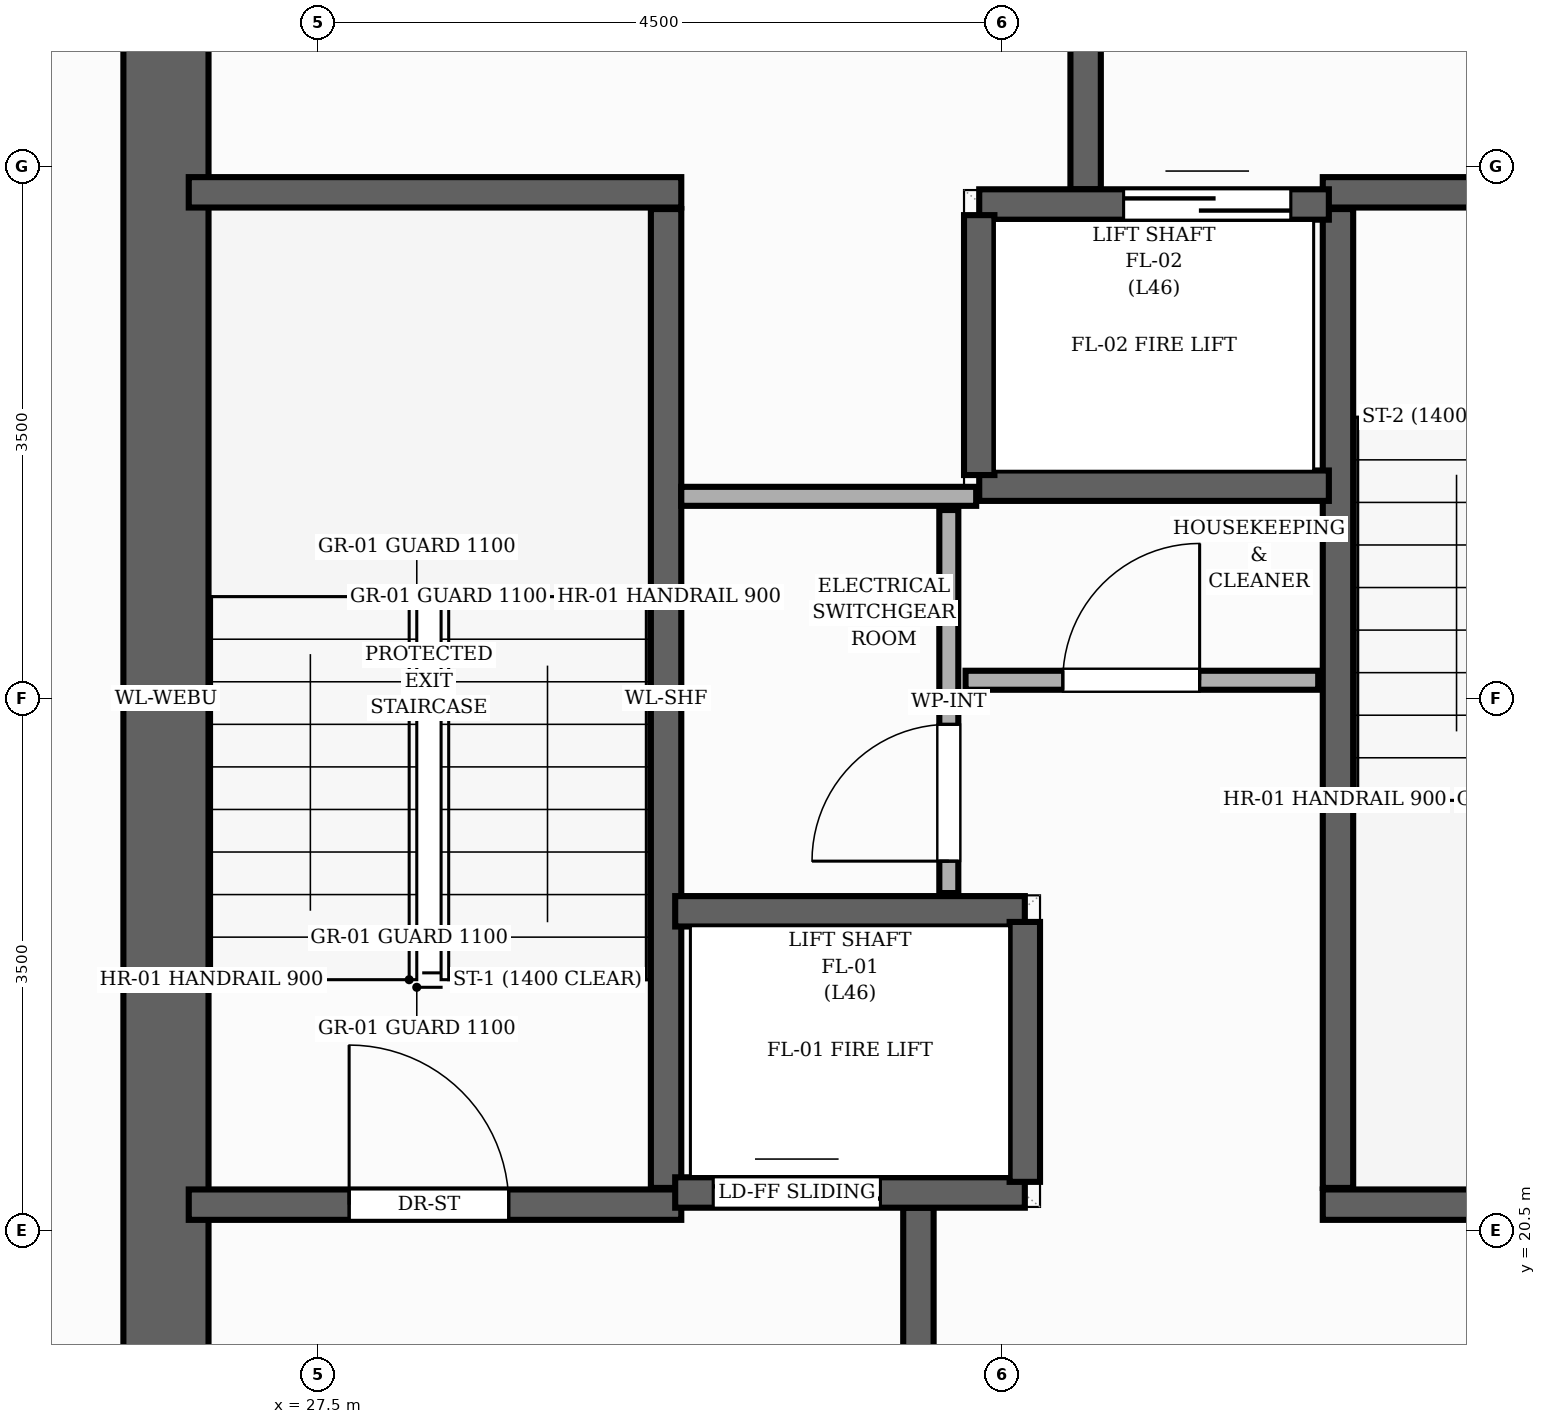
"""IFC4 building model, lengths in metres.
Left out: names, types, materials, properties, quantities, classifications, styles, units other than length and angle.
Written with IfcOpenShell. Run it as: python <this file> out.ifc"""

import sys

from ifc_helpers import new_model, si_unit, direction, frame, frame_2d, origin, place, context, subcontext, project, spatial, rectangle, extrude, element, fill, save


model = new_model("IFC4")
c1 = context("Model", 3, precision=1e-05, world=origin(), true_north=direction((0.0, 1.0)))
c2 = subcontext(c1, "Body", "Model", "MODEL_VIEW")
j1 = project(units=[si_unit("LENGTHUNIT", "METRE"), si_unit("PLANEANGLEUNIT", "RADIAN")], contexts=[c1])
p1 = place(None, origin())
s1 = spatial("IfcSite", under=j1, at=p1, CompositionType="ELEMENT")
p2 = place(p1, origin())
s2 = spatial("IfcBuilding", under=s1, at=p2, CompositionType="ELEMENT")
p3 = place(p2, frame((0.0, 0.0, 155.36)))
s3 = spatial("IfcBuildingStorey", under=s2, at=p3, CompositionType="ELEMENT", Elevation=155.36)
p4 = place(p3, frame((26.5, 17.3, 0.0), z_axis=(0.0, 0.0, 1.0), x_axis=(0.0, 1.0, 0.0)))
e1 = element("IfcWall", 1, at=p4, inside=s3, PredefinedType="SHEAR", context=c2, shape_type="SweptSolid", body=[
    extrude(rectangle(XDim=13.4, YDim=0.56, at=frame_2d((6.7, 0.0))), origin(), (0.0, 0.0, 1.0), 3.2),
])
p5 = place(p3, frame((29.79, 20.78, 0.0), z_axis=(0.0, 0.0, 1.0), x_axis=(0.0, 1.0, 0.0)))
e2 = element("IfcWall", 2, at=p5, inside=s3, PredefinedType="SHEAR", context=c2, shape_type="SweptSolid", body=[
    extrude(rectangle(XDim=6.44, YDim=0.2, at=frame_2d((3.22, 0.0))), origin(), (0.0, 0.0, 1.0), 3.2),
])
p6 = place(p3, frame((26.65, 27.33, 0.0), z_axis=(0.0, 0.0, 1.0), x_axis=(1.0, 0.0, 0.0)))
e3 = element("IfcWall", 3, at=p6, inside=s3, PredefinedType="SHEAR", context=c2, shape_type="SweptSolid", body=[
    extrude(rectangle(XDim=3.24, YDim=0.2, at=frame_2d((1.62, 0.0))), origin(), (0.0, 0.0, 1.0), 3.2),
])
p7 = place(p3, frame((26.65, 20.67, 0.0), z_axis=(0.0, 0.0, 1.0), x_axis=(1.0, 0.0, 0.0)))
e4 = element("IfcWall", 4, at=p7, inside=s3, PredefinedType="SHEAR", context=c2, shape_type="SweptSolid", body=[
    extrude(rectangle(XDim=3.24, YDim=0.2, at=frame_2d((1.62, 0.0))), origin(), (0.0, 0.0, 1.0), 3.2),
])
p8 = place(p7, frame((1.055, 0.0, 0.0)))
e5 = element("IfcOpeningElement", 5, at=p8, cuts=e4, PredefinedType="OPENING", context=c2, shape_type="SweptSolid", body=[
    extrude(rectangle(XDim=1.05, YDim=2.15, at=frame_2d((0.525, 1.075))), frame((0.0, 0.11, 0.0), z_axis=(0.0, -1.0, 0.0), x_axis=(1.0, 0.0, 0.0)), (0.0, 0.0, 1.0), 0.22),
])
p9 = place(p3, frame((34.21, 20.78, 0.0), z_axis=(0.0, 0.0, 1.0), x_axis=(0.0, 1.0, 0.0)))
e6 = element("IfcWall", 6, at=p9, inside=s3, PredefinedType="SHEAR", context=c2, shape_type="SweptSolid", body=[
    extrude(rectangle(XDim=6.44, YDim=0.2, at=frame_2d((3.22, 0.0))), origin(), (0.0, 0.0, 1.0), 3.2),
])
p10 = place(p3, frame((34.11, 20.67, 0.0), z_axis=(0.0, 0.0, 1.0), x_axis=(1.0, 0.0, 0.0)))
e7 = element("IfcWall", 7, at=p10, inside=s3, PredefinedType="SHEAR", context=c2, shape_type="SweptSolid", body=[
    extrude(rectangle(XDim=3.24, YDim=0.2, at=frame_2d((1.62, 0.0))), origin(), (0.0, 0.0, 1.0), 3.2),
])
p11 = place(p3, frame((34.11, 27.33, 0.0), z_axis=(0.0, 0.0, 1.0), x_axis=(1.0, 0.0, 0.0)))
e8 = element("IfcWall", 8, at=p11, inside=s3, PredefinedType="SHEAR", context=c2, shape_type="SweptSolid", body=[
    extrude(rectangle(XDim=3.24, YDim=0.2, at=frame_2d((1.62, 0.0))), origin(), (0.0, 0.0, 1.0), 3.2),
])
p12 = place(p11, frame((1.135, 0.0, 0.0)))
e9 = element("IfcOpeningElement", 9, at=p12, cuts=e8, PredefinedType="OPENING", context=c2, shape_type="SweptSolid", body=[
    extrude(rectangle(XDim=1.05, YDim=2.15, at=frame_2d((0.525, 1.075))), frame((0.0, 0.11, 0.0), z_axis=(0.0, -1.0, 0.0), x_axis=(1.0, 0.0, 0.0)), (0.0, 0.0, 1.0), 0.22),
])
for number, where, z_axis, x_axis in (
    (10, (31.45, 17.15, 0.0), (0.0, 0.0, 1.0), (0.0, 1.0, 0.0)),
    (11, (32.55, 27.35, 0.0), (0.0, 0.0, 1.0), (0.0, 1.0, 0.0)),
):
    element("IfcWall", number, at=place(p3, frame(where, z_axis=z_axis, x_axis=x_axis)), inside=s3, PredefinedType="SHEAR", context=c2, shape_type="SweptSolid", body=[
        extrude(rectangle(XDim=3.5, YDim=0.2, at=frame_2d((1.75, 0.0))), origin(), (0.0, 0.0, 1.0), 3.2),
    ])
p13 = place(p3, frame((29.85, 20.75, 0.0), z_axis=(0.0, 0.0, 1.0), x_axis=(1.0, 0.0, 0.0)))
e12 = element("IfcWall", 12, at=p13, inside=s3, PredefinedType="SHEAR", context=c2, shape_type="SweptSolid", body=[
    extrude(rectangle(XDim=2.3, YDim=0.2, at=frame_2d((1.15, 0.0))), origin(), (0.0, 0.0, 1.0), 3.2),
])
p14 = place(p13, frame((0.25, 0.0, 0.0)))
e13 = element("IfcOpeningElement", 13, at=p14, cuts=e12, PredefinedType="OPENING", context=c2, shape_type="SweptSolid", body=[
    extrude(rectangle(XDim=1.1, YDim=2.15, at=frame_2d((0.55, 1.075))), frame((0.0, 0.11, 0.0), z_axis=(0.0, -1.0, 0.0), x_axis=(1.0, 0.0, 0.0)), (0.0, 0.0, 1.0), 0.22),
])
p15 = place(p3, frame((29.85, 22.6, 0.0), z_axis=(0.0, 0.0, 1.0), x_axis=(1.0, 0.0, 0.0)))
e14 = element("IfcWall", 14, at=p15, inside=s3, PredefinedType="SHEAR", context=c2, shape_type="SweptSolid", body=[
    extrude(rectangle(XDim=2.3, YDim=0.2, at=frame_2d((1.15, 0.0))), origin(), (0.0, 0.0, 1.0), 3.2),
])
p16 = place(p3, frame((32.15, 20.82, 0.0), z_axis=(0.0, 0.0, 1.0), x_axis=(0.0, 1.0, 0.0)))
e15 = element("IfcWall", 15, at=p16, inside=s3, PredefinedType="SHEAR", context=c2, shape_type="SweptSolid", body=[
    extrude(rectangle(XDim=1.71, YDim=0.2, at=frame_2d((0.855, 0.0))), origin(), (0.0, 0.0, 1.0), 3.2),
])
p17 = place(p3, frame((31.85, 27.25, 0.0), z_axis=(0.0, 0.0, 1.0), x_axis=(1.0, 0.0, 0.0)))
e16 = element("IfcWall", 16, at=p17, inside=s3, PredefinedType="SHEAR", context=c2, shape_type="SweptSolid", body=[
    extrude(rectangle(XDim=2.3, YDim=0.2, at=frame_2d((1.15, 0.0))), origin(), (0.0, 0.0, 1.0), 3.2),
])
p18 = place(p17, frame((0.95, 0.0, 0.0)))
e17 = element("IfcOpeningElement", 17, at=p18, cuts=e16, PredefinedType="OPENING", context=c2, shape_type="SweptSolid", body=[
    extrude(rectangle(XDim=1.1, YDim=2.15, at=frame_2d((0.55, 1.075))), frame((0.0, 0.11, 0.0), z_axis=(0.0, -1.0, 0.0), x_axis=(1.0, 0.0, 0.0)), (0.0, 0.0, 1.0), 0.22),
])
p19 = place(p3, frame((31.85, 25.4, 0.0), z_axis=(0.0, 0.0, 1.0), x_axis=(1.0, 0.0, 0.0)))
e18 = element("IfcWall", 18, at=p19, inside=s3, PredefinedType="SHEAR", context=c2, shape_type="SweptSolid", body=[
    extrude(rectangle(XDim=2.3, YDim=0.2, at=frame_2d((1.15, 0.0))), origin(), (0.0, 0.0, 1.0), 3.2),
])
p20 = place(p3, frame((31.85, 25.47, 0.0), z_axis=(0.0, 0.0, 1.0), x_axis=(0.0, 1.0, 0.0)))
e19 = element("IfcWall", 19, at=p20, inside=s3, PredefinedType="SHEAR", context=c2, shape_type="SweptSolid", body=[
    extrude(rectangle(XDim=1.71, YDim=0.2, at=frame_2d((0.855, 0.0))), origin(), (0.0, 0.0, 1.0), 3.2),
])
p21 = place(p3, frame((31.65, 22.72, 0.0), z_axis=(0.0, 0.0, 1.0), x_axis=(0.0, 1.0, 0.0)))
e20 = element("IfcWall", 20, at=p21, inside=s3, PredefinedType="PARTITIONING", context=c2, shape_type="SweptSolid", body=[
    extrude(rectangle(XDim=2.52, YDim=0.125, at=frame_2d((1.26, 0.0))), origin(), (0.0, 0.0, 1.0), 2.795),
])
p22 = place(p21, frame((0.21, 0.0, 0.0)))
e21 = element("IfcOpeningElement", 21, at=p22, cuts=e20, PredefinedType="OPENING", context=c2, shape_type="SweptSolid", body=[
    extrude(rectangle(XDim=0.9, YDim=2.1, at=frame_2d((0.45, 1.05))), frame((0.0, 0.073, 0.0), z_axis=(0.0, -1.0, 0.0), x_axis=(1.0, 0.0, 0.0)), (0.0, 0.0, 1.0), 0.145),
])
p23 = place(p3, frame((31.76, 24.12, 0.0), z_axis=(0.0, 0.0, 1.0), x_axis=(1.0, 0.0, 0.0)))
e22 = element("IfcWall", 22, at=p23, inside=s3, PredefinedType="PARTITIONING", context=c2, shape_type="SweptSolid", body=[
    extrude(rectangle(XDim=2.32, YDim=0.125, at=frame_2d((1.16, 0.0))), origin(), (0.0, 0.0, 1.0), 2.795),
])
p24 = place(p23, frame((0.64, 0.0, 0.0)))
e23 = element("IfcOpeningElement", 23, at=p24, cuts=e22, PredefinedType="OPENING", context=c2, shape_type="SweptSolid", body=[
    extrude(rectangle(XDim=0.9, YDim=2.1, at=frame_2d((0.45, 1.05))), frame((0.0, 0.073, 0.0), z_axis=(0.0, -1.0, 0.0), x_axis=(1.0, 0.0, 0.0)), (0.0, 0.0, 1.0), 0.145),
])
p25 = place(p3, frame((29.89, 25.33, 0.0), z_axis=(0.0, 0.0, 1.0), x_axis=(1.0, 0.0, 0.0)))
e24 = element("IfcWall", 24, at=p25, inside=s3, PredefinedType="PARTITIONING", context=c2, shape_type="SweptSolid", body=[
    extrude(rectangle(XDim=1.94, YDim=0.125, at=frame_2d((0.97, 0.0))), origin(), (0.0, 0.0, 1.0), 2.795),
])
p26 = place(p8, origin())
e25 = element("IfcDoor", 25, at=p26, inside=s3, OperationType="SINGLE_SWING_LEFT", PredefinedType="DOOR", context=c2, shape_type="SweptSolid", body=[
    extrude(rectangle(XDim=1.05, YDim=2.15, at=frame_2d((0.525, 1.075))), frame((0.0, 0.025, 0.0), z_axis=(0.0, -1.0, 0.0), x_axis=(1.0, 0.0, 0.0)), (0.0, 0.0, 1.0), 0.05),
])
fill(e5, e25)
p27 = place(p14, origin())
e26 = element("IfcDoor", 26, at=p27, inside=s3, OperationType="DOUBLE_DOOR_SLIDING", PredefinedType="DOOR", context=c2, shape_type="SweptSolid", body=[
    extrude(rectangle(XDim=1.1, YDim=2.15, at=frame_2d((0.55, 1.075))), frame((0.0, 0.025, 0.0), z_axis=(0.0, -1.0, 0.0), x_axis=(1.0, 0.0, 0.0)), (0.0, 0.0, 1.0), 0.05),
])
fill(e13, e26)
p28 = place(p18, origin())
e27 = element("IfcDoor", 27, at=p28, inside=s3, OperationType="DOUBLE_DOOR_SLIDING", PredefinedType="DOOR", context=c2, shape_type="SweptSolid", body=[
    extrude(rectangle(XDim=1.1, YDim=2.15, at=frame_2d((0.55, 1.075))), frame((0.0, 0.025, 0.0), z_axis=(0.0, -1.0, 0.0), x_axis=(1.0, 0.0, 0.0)), (0.0, 0.0, 1.0), 0.05),
])
fill(e17, e27)
p29 = place(p22, origin())
e28 = element("IfcDoor", 28, at=p29, inside=s3, OperationType="SINGLE_SWING_LEFT", PredefinedType="DOOR", context=c2, shape_type="SweptSolid", body=[
    extrude(rectangle(XDim=0.9, YDim=2.1, at=frame_2d((0.45, 1.05))), frame((0.0, 0.025, 0.0), z_axis=(0.0, -1.0, 0.0), x_axis=(1.0, 0.0, 0.0)), (0.0, 0.0, 1.0), 0.05),
])
fill(e21, e28)
p30 = place(p24, origin())
e29 = element("IfcDoor", 29, at=p30, inside=s3, OperationType="SINGLE_SWING_RIGHT", PredefinedType="DOOR", context=c2, shape_type="SweptSolid", body=[
    extrude(rectangle(XDim=0.9, YDim=2.1, at=frame_2d((0.45, 1.05))), frame((0.0, 0.025, 0.0), z_axis=(0.0, -1.0, 0.0), x_axis=(1.0, 0.0, 0.0)), (0.0, 0.0, 1.0), 0.05),
])
fill(e23, e29)
save(model, sys.argv[1])
